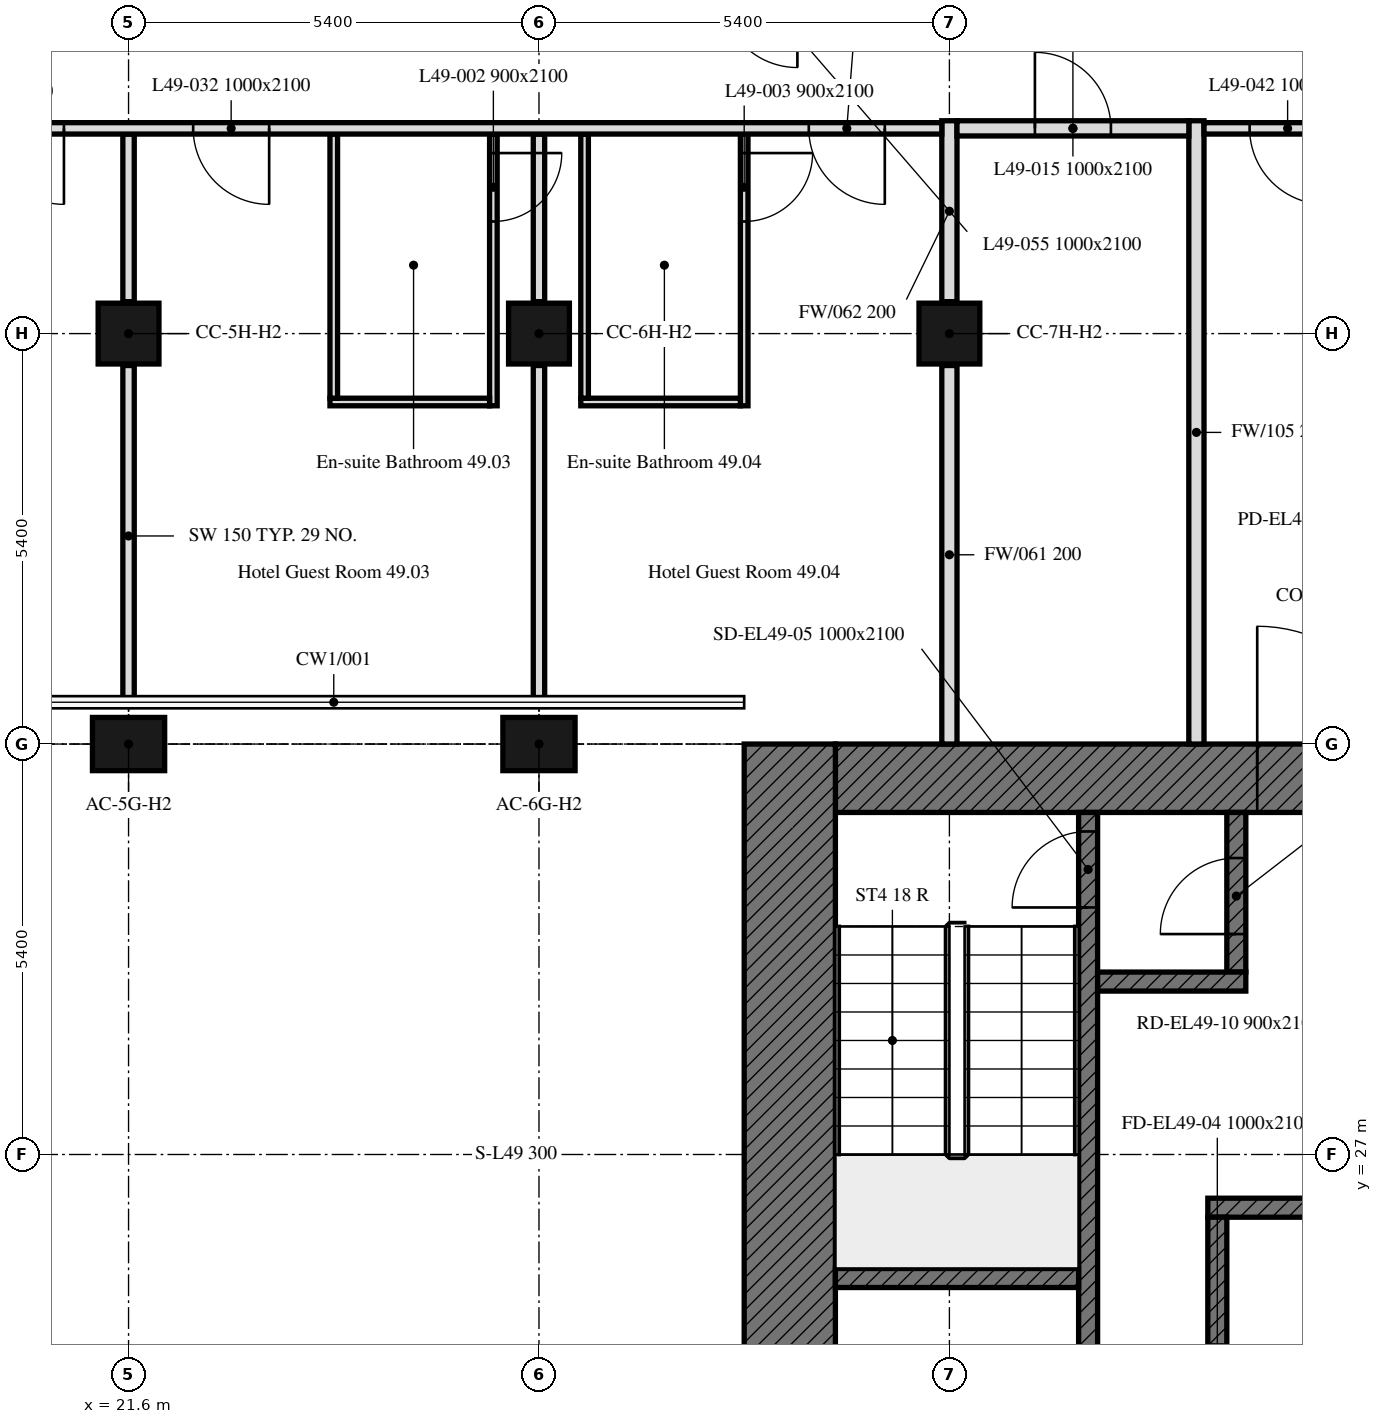
"""IFC4 building model, lengths in metres.
Left out: names, types, materials, properties, quantities, classifications, styles, units other than length and angle.
Written with IfcOpenShell. Run it as: python <this file> out.ifc"""

import sys

from ifc_helpers import new_model, si_unit, direction, frame, frame_2d, origin, origin_2d, place, context, subcontext, project, spatial, rectangle, extrude, element, fill, save


model = new_model("IFC4")
c1 = context("Model", 3, precision=1e-05, world=origin(), true_north=direction((0.0, 1.0)))
c2 = subcontext(c1, "Body", "Model", "MODEL_VIEW")
j1 = project(units=[si_unit("LENGTHUNIT", "METRE"), si_unit("PLANEANGLEUNIT", "RADIAN")], contexts=[c1])
p1 = place(None, origin())
s1 = spatial("IfcSite", under=j1, at=p1, CompositionType="ELEMENT")
p2 = place(p1, origin())
s2 = spatial("IfcBuilding", under=s1, at=p2, CompositionType="ELEMENT")
p3 = place(p2, frame((0.0, 0.0, 200.5)))
s3 = spatial("IfcBuildingStorey", under=s2, at=p3, CompositionType="ELEMENT", Elevation=200.5)
for number, where, z_axis, x_axis in (
    (1, (21.6, 32.4, 0.0), (0.0, 0.0, 1.0), (1.0, 0.0, 0.0)),
    (2, (27.0, 32.4, 0.0), (0.0, 0.0, 1.0), (1.0, 0.0, 0.0)),
):
    element("IfcColumn", number, at=place(p3, frame(where, z_axis=z_axis, x_axis=x_axis)), inside=s3, PredefinedType="COLUMN", context=c2, shape_type="SweptSolid", body=[
        extrude(rectangle(XDim=0.95, YDim=0.7, at=origin_2d()), origin(), (0.0, 0.0, 1.0), 3.0),
    ])
for number, where, z_axis, x_axis in (
    (3, (21.6, 37.8, 0.0), (0.0, 0.0, 1.0), (1.0, 0.0, 0.0)),
    (4, (27.0, 37.8, 0.0), (0.0, 0.0, 1.0), (1.0, 0.0, 0.0)),
    (5, (32.4, 37.8, 0.0), (0.0, 0.0, 1.0), (1.0, 0.0, 0.0)),
):
    element("IfcColumn", number, at=place(p3, frame(where, z_axis=z_axis, x_axis=x_axis)), inside=s3, PredefinedType="COLUMN", context=c2, shape_type="SweptSolid", body=[
        extrude(rectangle(XDim=0.8, YDim=0.8, at=origin_2d()), origin(), (0.0, 0.0, 1.0), 3.0),
    ])
p4 = place(p3, frame((30.9, 31.95, 0.0), z_axis=(0.0, 0.0, 1.0), x_axis=(1.0, 0.0, 0.0)))
e6 = element("IfcWall", 6, at=p4, inside=s3, PredefinedType="SOLIDWALL", context=c2, shape_type="SweptSolid", body=[
    extrude(rectangle(XDim=11.1, YDim=0.9, at=frame_2d((5.55, 0.0))), origin(), (0.0, 0.0, 1.0), 3.0),
])
p5 = place(p4, frame((5.55, 0.0, 0.0)))
e7 = element("IfcOpeningElement", 7, at=p5, cuts=e6, PredefinedType="OPENING", context=c2, shape_type="SweptSolid", body=[
    extrude(rectangle(XDim=2.0, YDim=2.4, at=frame_2d((1.0, 1.2))), frame((0.0, 0.45, 0.0), z_axis=(0.0, -1.0, 0.0), x_axis=(1.0, 0.0, 0.0)), (0.0, 0.0, 1.0), 0.9),
])
p6 = place(p3, frame((30.3, 16.2, 0.0), z_axis=(0.0, 0.0, 1.0), x_axis=(0.0, 1.0, 0.0)))
e8 = element("IfcWall", 8, at=p6, inside=s3, PredefinedType="SOLIDWALL", context=c2, shape_type="SweptSolid", body=[
    extrude(rectangle(XDim=16.2, YDim=1.2, at=frame_2d((8.1, 0.0))), origin(), (0.0, 0.0, 1.0), 3.0),
])
p7 = place(p3, frame((34.225, 17.1, 0.0), z_axis=(0.0, 0.0, 1.0), x_axis=(0.0, 1.0, 0.0)))
e9 = element("IfcWall", 9, at=p7, inside=s3, PredefinedType="SOLIDWALL", context=c2, shape_type="SweptSolid", body=[
    extrude(rectangle(XDim=14.4, YDim=0.25, at=frame_2d((7.2, 0.0))), origin(), (0.0, 0.0, 1.0), 3.0),
])
p8 = place(p7, frame((13.15, 0.0, 0.0)))
e10 = element("IfcOpeningElement", 10, at=p8, cuts=e9, PredefinedType="OPENING", context=c2, shape_type="SweptSolid", body=[
    extrude(rectangle(XDim=1.0, YDim=2.1, at=frame_2d((0.5, 1.05))), frame((0.0, 0.125, 0.0), z_axis=(0.0, -1.0, 0.0), x_axis=(1.0, 0.0, 0.0)), (0.0, 0.0, 1.0), 0.25),
])
p9 = place(p7, frame((0.6, 0.0, 0.0)))
e11 = element("IfcOpeningElement", 11, at=p9, cuts=e9, PredefinedType="OPENING", context=c2, shape_type="SweptSolid", body=[
    extrude(rectangle(XDim=1.1, YDim=2.1, at=frame_2d((0.55, 1.05))), frame((0.0, 0.125, 0.0), z_axis=(0.0, -1.0, 0.0), x_axis=(1.0, 0.0, 0.0)), (0.0, 0.0, 1.0), 0.25),
])
p10 = place(p7, frame((3.25, 0.0, 0.0)))
e12 = element("IfcOpeningElement", 12, at=p10, cuts=e9, PredefinedType="OPENING", context=c2, shape_type="SweptSolid", body=[
    extrude(rectangle(XDim=0.9, YDim=2.1, at=frame_2d((0.45, 1.05))), frame((0.0, 0.125, 0.0), z_axis=(0.0, -1.0, 0.0), x_axis=(1.0, 0.0, 0.0)), (0.0, 0.0, 1.0), 0.25),
])
p11 = place(p3, frame((30.9, 25.375, 0.0), z_axis=(0.0, 0.0, 1.0), x_axis=(1.0, 0.0, 0.0)))
e13 = element("IfcWall", 13, at=p11, inside=s3, PredefinedType="SOLIDWALL", context=c2, shape_type="SweptSolid", body=[
    extrude(rectangle(XDim=3.2, YDim=0.25, at=frame_2d((1.6, 0.0))), origin(), (0.0, 0.0, 1.0), 3.0),
])
p12 = place(p3, frame((35.8, 26.3, 0.0), z_axis=(0.0, 0.0, 1.0), x_axis=(1.0, 0.0, 0.0)))
e14 = element("IfcWall", 14, at=p12, inside=s3, PredefinedType="SOLIDWALL", context=c2, shape_type="SweptSolid", body=[
    extrude(rectangle(XDim=2.75, YDim=0.25, at=frame_2d((1.375, 0.0))), origin(), (0.0, 0.0, 1.0), 3.0),
])
p13 = place(p3, frame((36.175, 29.4, 0.0), z_axis=(0.0, 0.0, 1.0), x_axis=(0.0, 1.0, 0.0)))
e15 = element("IfcWall", 15, at=p13, inside=s3, PredefinedType="SOLIDWALL", context=c2, shape_type="SweptSolid", body=[
    extrude(rectangle(XDim=2.1, YDim=0.25, at=frame_2d((1.05, 0.0))), origin(), (0.0, 0.0, 1.0), 3.0),
])
p14 = place(p13, frame((0.5, 0.0, 0.0)))
e16 = element("IfcOpeningElement", 16, at=p14, cuts=e15, PredefinedType="OPENING", context=c2, shape_type="SweptSolid", body=[
    extrude(rectangle(XDim=1.0, YDim=2.1, at=frame_2d((0.5, 1.05))), frame((0.0, 0.125, 0.0), z_axis=(0.0, -1.0, 0.0), x_axis=(1.0, 0.0, 0.0)), (0.0, 0.0, 1.0), 0.25),
])
p15 = place(p3, frame((34.35, 29.275, 0.0), z_axis=(0.0, 0.0, 1.0), x_axis=(1.0, 0.0, 0.0)))
e17 = element("IfcWall", 17, at=p15, inside=s3, PredefinedType="SOLIDWALL", context=c2, shape_type="SweptSolid", body=[
    extrude(rectangle(XDim=1.95, YDim=0.25, at=frame_2d((0.975, 0.0))), origin(), (0.0, 0.0, 1.0), 3.0),
])
p16 = place(p3, frame((35.925, 20.55, 0.0), z_axis=(0.0, 0.0, 1.0), x_axis=(0.0, 1.0, 0.0)))
e18 = element("IfcWall", 18, at=p16, inside=s3, PredefinedType="SOLIDWALL", context=c2, shape_type="SweptSolid", body=[
    extrude(rectangle(XDim=5.625, YDim=0.25, at=frame_2d((2.812, 0.0))), origin(), (0.0, 0.0, 1.0), 3.0),
])
p17 = place(p16, frame((2.95, 0.0, 0.0)))
e19 = element("IfcOpeningElement", 19, at=p17, cuts=e18, PredefinedType="OPENING", context=c2, shape_type="SweptSolid", body=[
    extrude(rectangle(XDim=1.0, YDim=2.1, at=frame_2d((0.5, 1.05))), frame((0.0, 0.125, 0.0), z_axis=(0.0, -1.0, 0.0), x_axis=(1.0, 0.0, 0.0)), (0.0, 0.0, 1.0), 0.25),
])
p18 = place(p3, frame((21.6, 32.895, 0.0), z_axis=(0.0, 0.0, 1.0), x_axis=(0.0, 1.0, 0.0)))
e20 = element("IfcWall", 20, at=p18, inside=s3, PredefinedType="PARTITIONING", context=c2, shape_type="SweptSolid", body=[
    extrude(rectangle(XDim=4.485, YDim=0.15, at=frame_2d((2.242, 0.0))), origin(), (0.0, 0.0, 1.0), 2.4),
])
p19 = place(p3, frame((21.6, 38.22, 0.0), z_axis=(0.0, 0.0, 1.0), x_axis=(0.0, 1.0, 0.0)))
e21 = element("IfcWall", 21, at=p19, inside=s3, PredefinedType="PARTITIONING", context=c2, shape_type="SweptSolid", body=[
    extrude(rectangle(XDim=2.205, YDim=0.15, at=frame_2d((1.103, 0.0))), origin(), (0.0, 0.0, 1.0), 2.4),
])
p20 = place(p3, frame((27.0, 32.895, 0.0), z_axis=(0.0, 0.0, 1.0), x_axis=(0.0, 1.0, 0.0)))
e22 = element("IfcWall", 22, at=p20, inside=s3, PredefinedType="PARTITIONING", context=c2, shape_type="SweptSolid", body=[
    extrude(rectangle(XDim=4.485, YDim=0.15, at=frame_2d((2.242, 0.0))), origin(), (0.0, 0.0, 1.0), 2.4),
])
p21 = place(p3, frame((27.0, 38.22, 0.0), z_axis=(0.0, 0.0, 1.0), x_axis=(0.0, 1.0, 0.0)))
e23 = element("IfcWall", 23, at=p21, inside=s3, PredefinedType="PARTITIONING", context=c2, shape_type="SweptSolid", body=[
    extrude(rectangle(XDim=2.205, YDim=0.15, at=frame_2d((1.103, 0.0))), origin(), (0.0, 0.0, 1.0), 2.4),
])
p22 = place(p3, frame((26.4, 40.425, 0.0), z_axis=(0.0, 0.0, 1.0), x_axis=(0.0, -1.0, 0.0)))
e24 = element("IfcWall", 24, at=p22, inside=s3, PredefinedType="PARTITIONING", context=c2, shape_type="SweptSolid", body=[
    extrude(rectangle(XDim=3.575, YDim=0.1, at=frame_2d((1.788, 0.0))), origin(), (0.0, 0.0, 1.0), 3.0),
])
p23 = place(p22, frame((0.25, 0.0, 0.0)))
e25 = element("IfcOpeningElement", 25, at=p23, cuts=e24, PredefinedType="OPENING", context=c2, shape_type="SweptSolid", body=[
    extrude(rectangle(XDim=0.9, YDim=2.1, at=frame_2d((0.45, 1.05))), frame((0.0, 0.05, 0.0), z_axis=(0.0, -1.0, 0.0), x_axis=(1.0, 0.0, 0.0)), (0.0, 0.0, 1.0), 0.1),
])
p24 = place(p3, frame((26.35, 36.9, 0.0), z_axis=(0.0, 0.0, 1.0), x_axis=(-1.0, 0.0, 0.0)))
e26 = element("IfcWall", 26, at=p24, inside=s3, PredefinedType="PARTITIONING", context=c2, shape_type="SweptSolid", body=[
    extrude(rectangle(XDim=2.1, YDim=0.1, at=frame_2d((1.05, 0.0))), origin(), (0.0, 0.0, 1.0), 3.0),
])
p25 = place(p3, frame((24.3, 36.95, 0.0), z_axis=(0.0, 0.0, 1.0), x_axis=(0.0, 1.0, 0.0)))
e27 = element("IfcWall", 27, at=p25, inside=s3, PredefinedType="PARTITIONING", context=c2, shape_type="SweptSolid", body=[
    extrude(rectangle(XDim=3.475, YDim=0.1, at=frame_2d((1.738, 0.0))), origin(), (0.0, 0.0, 1.0), 3.0),
])
p26 = place(p3, frame((32.4, 32.4, 0.0), z_axis=(0.0, 0.0, 1.0), x_axis=(0.0, 1.0, 0.0)))
e28 = element("IfcWall", 28, at=p26, inside=s3, PredefinedType="PARTITIONING", context=c2, shape_type="SweptSolid", body=[
    extrude(rectangle(XDim=4.98, YDim=0.2, at=frame_2d((2.49, 0.0))), origin(), (0.0, 0.0, 1.0), 2.4),
])
p27 = place(p3, frame((32.4, 38.22, 0.0), z_axis=(0.0, 0.0, 1.0), x_axis=(0.0, 1.0, 0.0)))
e29 = element("IfcWall", 29, at=p27, inside=s3, PredefinedType="PARTITIONING", context=c2, shape_type="SweptSolid", body=[
    extrude(rectangle(XDim=2.38, YDim=0.2, at=frame_2d((1.19, 0.0))), origin(), (0.0, 0.0, 1.0), 2.4),
])
p28 = place(p3, frame((29.7, 40.425, 0.0), z_axis=(0.0, 0.0, 1.0), x_axis=(0.0, -1.0, 0.0)))
e30 = element("IfcWall", 30, at=p28, inside=s3, PredefinedType="PARTITIONING", context=c2, shape_type="SweptSolid", body=[
    extrude(rectangle(XDim=3.575, YDim=0.1, at=frame_2d((1.788, 0.0))), origin(), (0.0, 0.0, 1.0), 3.0),
])
p29 = place(p28, frame((0.25, 0.0, 0.0)))
e31 = element("IfcOpeningElement", 31, at=p29, cuts=e30, PredefinedType="OPENING", context=c2, shape_type="SweptSolid", body=[
    extrude(rectangle(XDim=0.9, YDim=2.1, at=frame_2d((0.45, 1.05))), frame((0.0, 0.05, 0.0), z_axis=(0.0, -1.0, 0.0), x_axis=(1.0, 0.0, 0.0)), (0.0, 0.0, 1.0), 0.1),
])
p30 = place(p3, frame((29.65, 36.9, 0.0), z_axis=(0.0, 0.0, 1.0), x_axis=(-1.0, 0.0, 0.0)))
e32 = element("IfcWall", 32, at=p30, inside=s3, PredefinedType="PARTITIONING", context=c2, shape_type="SweptSolid", body=[
    extrude(rectangle(XDim=2.1, YDim=0.1, at=frame_2d((1.05, 0.0))), origin(), (0.0, 0.0, 1.0), 3.0),
])
p31 = place(p3, frame((27.6, 36.95, 0.0), z_axis=(0.0, 0.0, 1.0), x_axis=(0.0, 1.0, 0.0)))
e33 = element("IfcWall", 33, at=p31, inside=s3, PredefinedType="PARTITIONING", context=c2, shape_type="SweptSolid", body=[
    extrude(rectangle(XDim=3.475, YDim=0.1, at=frame_2d((1.738, 0.0))), origin(), (0.0, 0.0, 1.0), 3.0),
])
p32 = place(p3, frame((35.65, 40.6, 0.0), z_axis=(0.0, 0.0, 1.0), x_axis=(0.0, -1.0, 0.0)))
e34 = element("IfcWall", 34, at=p32, inside=s3, PredefinedType="PARTITIONING", context=c2, shape_type="SweptSolid", body=[
    extrude(rectangle(XDim=8.2, YDim=0.2, at=frame_2d((4.1, 0.0))), origin(), (0.0, 0.0, 1.0), 2.4),
])
p33 = place(p3, frame((32.3, 40.5, 0.0), z_axis=(0.0, 0.0, 1.0), x_axis=(-1.0, 0.0, 0.0)))
e35 = element("IfcWall", 35, at=p33, inside=s3, PredefinedType="PARTITIONING", context=c2, shape_type="SweptSolid", body=[
    extrude(rectangle(XDim=26.149, YDim=0.15, at=frame_2d((13.075, 0.0))), origin(), (0.0, 0.0, 1.0), 2.4),
])
p34 = place(p33, frame((23.12, 0.0, 0.0)))
e36 = element("IfcOpeningElement", 36, at=p34, cuts=e35, PredefinedType="OPENING", context=c2, shape_type="SweptSolid", body=[
    extrude(rectangle(XDim=1.0, YDim=2.1, at=frame_2d((0.5, 1.05))), frame((0.0, 0.075, 0.0), z_axis=(0.0, -1.0, 0.0), x_axis=(1.0, 0.0, 0.0)), (0.0, 0.0, 1.0), 0.15),
])
p35 = place(p33, frame((17.225, 0.0, 0.0)))
e37 = element("IfcOpeningElement", 37, at=p35, cuts=e35, PredefinedType="OPENING", context=c2, shape_type="SweptSolid", body=[
    extrude(rectangle(XDim=1.0, YDim=2.1, at=frame_2d((0.5, 1.05))), frame((0.0, 0.075, 0.0), z_axis=(0.0, -1.0, 0.0), x_axis=(1.0, 0.0, 0.0)), (0.0, 0.0, 1.0), 0.15),
])
p36 = place(p33, frame((11.55, 0.0, 0.0)))
e38 = element("IfcOpeningElement", 38, at=p36, cuts=e35, PredefinedType="OPENING", context=c2, shape_type="SweptSolid", body=[
    extrude(rectangle(XDim=1.0, YDim=2.1, at=frame_2d((0.5, 1.05))), frame((0.0, 0.075, 0.0), z_axis=(0.0, -1.0, 0.0), x_axis=(1.0, 0.0, 0.0)), (0.0, 0.0, 1.0), 0.15),
])
p37 = place(p33, frame((8.85, 0.0, 0.0)))
e39 = element("IfcOpeningElement", 39, at=p37, cuts=e35, PredefinedType="OPENING", context=c2, shape_type="SweptSolid", body=[
    extrude(rectangle(XDim=1.0, YDim=2.1, at=frame_2d((0.5, 1.05))), frame((0.0, 0.075, 0.0), z_axis=(0.0, -1.0, 0.0), x_axis=(1.0, 0.0, 0.0)), (0.0, 0.0, 1.0), 0.15),
])
p38 = place(p33, frame((0.75, 0.0, 0.0)))
e40 = element("IfcOpeningElement", 40, at=p38, cuts=e35, PredefinedType="OPENING", context=c2, shape_type="SweptSolid", body=[
    extrude(rectangle(XDim=1.0, YDim=2.1, at=frame_2d((0.5, 1.05))), frame((0.0, 0.075, 0.0), z_axis=(0.0, -1.0, 0.0), x_axis=(1.0, 0.0, 0.0)), (0.0, 0.0, 1.0), 0.15),
])
p39 = place(p33, frame((19.65, 0.0, 0.0)))
e41 = element("IfcOpeningElement", 41, at=p39, cuts=e35, PredefinedType="OPENING", context=c2, shape_type="SweptSolid", body=[
    extrude(rectangle(XDim=1.8, YDim=2.4, at=frame_2d((0.9, 1.2))), frame((0.0, 0.075, 0.0), z_axis=(0.0, -1.0, 0.0), x_axis=(1.0, 0.0, 0.0)), (0.0, 0.0, 1.0), 0.15),
])
p40 = place(p3, frame((32.5, 40.5, 0.0), z_axis=(0.0, 0.0, 1.0), x_axis=(1.0, 0.0, 0.0)))
e42 = element("IfcWall", 42, at=p40, inside=s3, PredefinedType="PARTITIONING", context=c2, shape_type="SweptSolid", body=[
    extrude(rectangle(XDim=3.05, YDim=0.2, at=frame_2d((1.525, 0.0))), origin(), (0.0, 0.0, 1.0), 3.0),
])
p41 = place(p40, frame((1.025, 0.0, 0.0)))
e43 = element("IfcOpeningElement", 43, at=p41, cuts=e42, PredefinedType="OPENING", context=c2, shape_type="SweptSolid", body=[
    extrude(rectangle(XDim=1.0, YDim=2.1, at=frame_2d((0.5, 1.05))), frame((0.0, 0.1, 0.0), z_axis=(0.0, -1.0, 0.0), x_axis=(1.0, 0.0, 0.0)), (0.0, 0.0, 1.0), 0.2),
])
p42 = place(p3, frame((43.275, 40.5, 0.0), z_axis=(0.0, 0.0, 1.0), x_axis=(-1.0, 0.0, 0.0)))
e44 = element("IfcWall", 44, at=p42, inside=s3, PredefinedType="PARTITIONING", context=c2, shape_type="SweptSolid", body=[
    extrude(rectangle(XDim=7.525, YDim=0.15, at=frame_2d((3.762, 0.0))), origin(), (0.0, 0.0, 1.0), 2.4),
])
p43 = place(p42, frame((5.925, 0.0, 0.0)))
e45 = element("IfcOpeningElement", 45, at=p43, cuts=e44, PredefinedType="OPENING", context=c2, shape_type="SweptSolid", body=[
    extrude(rectangle(XDim=1.0, YDim=2.1, at=frame_2d((0.5, 1.05))), frame((0.0, 0.075, 0.0), z_axis=(0.0, -1.0, 0.0), x_axis=(1.0, 0.0, 0.0)), (0.0, 0.0, 1.0), 0.15),
])
p44 = place(p5, origin())
e46 = element("IfcDoor", 46, at=p44, inside=s3, OperationType="DOUBLE_DOOR_SINGLE_SWING", PredefinedType="DOOR", context=c2, shape_type="SweptSolid", body=[
    extrude(rectangle(XDim=2.0, YDim=2.4, at=frame_2d((1.0, 1.2))), frame((0.0, 0.025, 0.0), z_axis=(0.0, -1.0, 0.0), x_axis=(1.0, 0.0, 0.0)), (0.0, 0.0, 1.0), 0.05),
])
fill(e7, e46)
p45 = place(p8, origin())
e47 = element("IfcDoor", 47, at=p45, inside=s3, OperationType="SINGLE_SWING_LEFT", PredefinedType="DOOR", context=c2, shape_type="SweptSolid", body=[
    extrude(rectangle(XDim=1.0, YDim=2.1, at=frame_2d((0.5, 1.05))), frame((0.0, 0.025, 0.0), z_axis=(0.0, -1.0, 0.0), x_axis=(1.0, 0.0, 0.0)), (0.0, 0.0, 1.0), 0.05),
])
fill(e10, e47)
p46 = place(p14, origin())
e48 = element("IfcDoor", 48, at=p46, inside=s3, OperationType="SINGLE_SWING_LEFT", PredefinedType="DOOR", context=c2, shape_type="SweptSolid", body=[
    extrude(rectangle(XDim=1.0, YDim=2.1, at=frame_2d((0.5, 1.05))), frame((0.0, 0.025, 0.0), z_axis=(0.0, -1.0, 0.0), x_axis=(1.0, 0.0, 0.0)), (0.0, 0.0, 1.0), 0.05),
])
fill(e16, e48)
p47 = place(p23, origin())
e49 = element("IfcDoor", 49, at=p47, inside=s3, OperationType="SINGLE_SWING_LEFT", PredefinedType="DOOR", context=c2, shape_type="SweptSolid", body=[
    extrude(rectangle(XDim=0.9, YDim=2.1, at=frame_2d((0.45, 1.05))), frame((0.0, 0.025, 0.0), z_axis=(0.0, -1.0, 0.0), x_axis=(1.0, 0.0, 0.0)), (0.0, 0.0, 1.0), 0.05),
])
fill(e25, e49)
p48 = place(p29, origin())
e50 = element("IfcDoor", 50, at=p48, inside=s3, OperationType="SINGLE_SWING_RIGHT", PredefinedType="DOOR", context=c2, shape_type="SweptSolid", body=[
    extrude(rectangle(XDim=0.9, YDim=2.1, at=frame_2d((0.45, 1.05))), frame((0.0, 0.025, 0.0), z_axis=(0.0, -1.0, 0.0), x_axis=(1.0, 0.0, 0.0)), (0.0, 0.0, 1.0), 0.05),
])
fill(e31, e50)
p49 = place(p41, origin())
e51 = element("IfcDoor", 51, at=p49, inside=s3, OperationType="SINGLE_SWING_LEFT", PredefinedType="DOOR", context=c2, shape_type="SweptSolid", body=[
    extrude(rectangle(XDim=1.0, YDim=2.1, at=frame_2d((0.5, 1.05))), frame((0.0, 0.025, 0.0), z_axis=(0.0, -1.0, 0.0), x_axis=(1.0, 0.0, 0.0)), (0.0, 0.0, 1.0), 0.05),
])
fill(e43, e51)
p50 = place(p36, origin())
e52 = element("IfcDoor", 52, at=p50, inside=s3, OperationType="SINGLE_SWING_LEFT", PredefinedType="DOOR", context=c2, shape_type="SweptSolid", body=[
    extrude(rectangle(XDim=1.0, YDim=2.1, at=frame_2d((0.5, 1.05))), frame((0.0, 0.025, 0.0), z_axis=(0.0, -1.0, 0.0), x_axis=(1.0, 0.0, 0.0)), (0.0, 0.0, 1.0), 0.05),
])
fill(e38, e52)
p51 = place(p37, origin())
e53 = element("IfcDoor", 53, at=p51, inside=s3, OperationType="SINGLE_SWING_RIGHT", PredefinedType="DOOR", context=c2, shape_type="SweptSolid", body=[
    extrude(rectangle(XDim=1.0, YDim=2.1, at=frame_2d((0.5, 1.05))), frame((0.0, 0.025, 0.0), z_axis=(0.0, -1.0, 0.0), x_axis=(1.0, 0.0, 0.0)), (0.0, 0.0, 1.0), 0.05),
])
fill(e39, e53)
p52 = place(p38, origin())
e54 = element("IfcDoor", 54, at=p52, inside=s3, OperationType="SINGLE_SWING_LEFT", PredefinedType="DOOR", context=c2, shape_type="SweptSolid", body=[
    extrude(rectangle(XDim=1.0, YDim=2.1, at=frame_2d((0.5, 1.05))), frame((0.0, 0.025, 0.0), z_axis=(0.0, -1.0, 0.0), x_axis=(1.0, 0.0, 0.0)), (0.0, 0.0, 1.0), 0.05),
])
fill(e40, e54)
p53 = place(p43, origin())
e55 = element("IfcDoor", 55, at=p53, inside=s3, OperationType="SINGLE_SWING_LEFT", PredefinedType="DOOR", context=c2, shape_type="SweptSolid", body=[
    extrude(rectangle(XDim=1.0, YDim=2.1, at=frame_2d((0.5, 1.05))), frame((0.0, 0.025, 0.0), z_axis=(0.0, -1.0, 0.0), x_axis=(1.0, 0.0, 0.0)), (0.0, 0.0, 1.0), 0.05),
])
fill(e45, e55)
save(model, sys.argv[1])
